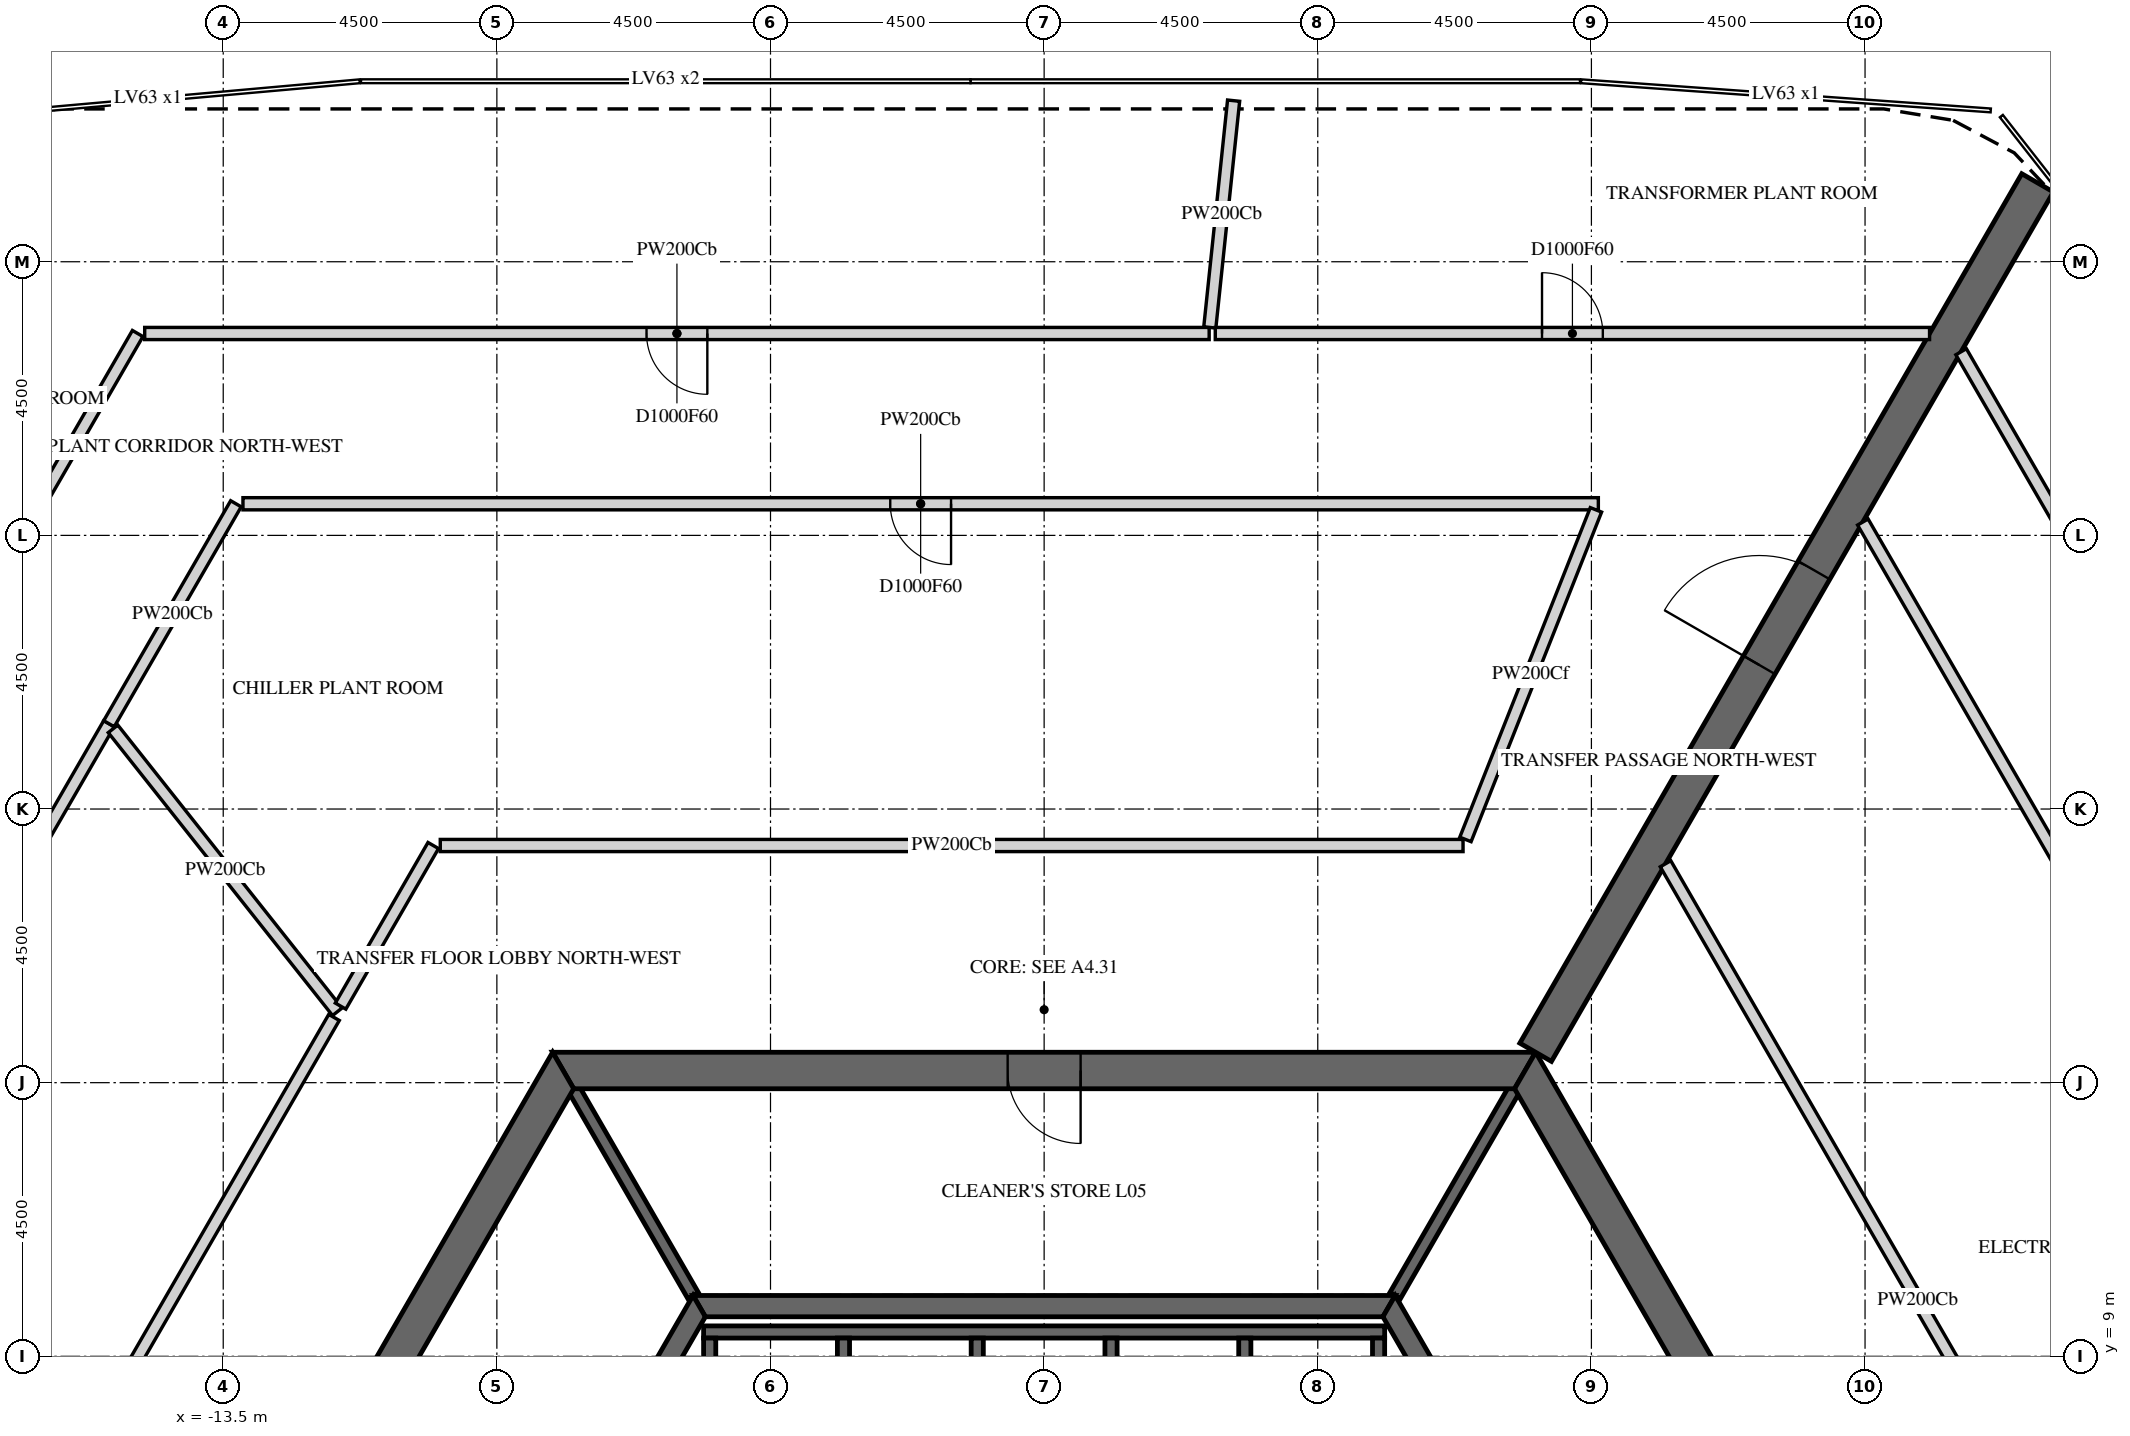
"""IFC4 building model, lengths in metres.
Left out: names, types, materials, properties, quantities, classifications, styles, units other than length and angle.
Written with IfcOpenShell. Run it as: python <this file> out.ifc"""

import sys

from ifc_helpers import new_model, si_unit, direction, frame, frame_2d, origin, place, context, subcontext, project, spatial, polyline, rectangle, outline, extrude, element, fill, save


model = new_model("IFC4")
c1 = context("Model", 3, precision=1e-05, world=origin(), true_north=direction((0.0, 1.0)))
c2 = subcontext(c1, "Body", "Model", "MODEL_VIEW")
j1 = project(units=[si_unit("LENGTHUNIT", "METRE"), si_unit("PLANEANGLEUNIT", "RADIAN")], contexts=[c1])
p1 = place(None, origin())
s1 = spatial("IfcSite", under=j1, at=p1, CompositionType="ELEMENT")
p2 = place(p1, origin())
s2 = spatial("IfcBuilding", under=s1, at=p2, CompositionType="ELEMENT")
p3 = place(p2, frame((0.0, 0.0, 31.5)))
s3 = spatial("IfcBuildingStorey", under=s2, at=p3, CompositionType="ELEMENT", Elevation=31.5)
p4 = place(p3, frame((-7.91, 13.7, -0.3), z_axis=(0.0, 0.0, 1.0), x_axis=(-0.499999880136, -0.866025472988, 0.0)))
e1 = element("IfcWall", 1, at=p4, inside=s3, PredefinedType="SHEAR", context=c2, shape_type="SweptSolid", body=[
    extrude(outline(polyline([(-0.173, -0.3), (15.993, -0.3), (15.646, 0.3), (0.173, 0.3), (-0.173, -0.3)])), origin(), (0.0, 0.0, 1.0), 6.15),
])
p5 = place(p4, frame((7.039, 0.0, 0.3)))
e2 = element("IfcOpeningElement", 2, at=p5, cuts=e1, PredefinedType="OPENING", context=c2, shape_type="SweptSolid", body=[
    extrude(rectangle(XDim=1.8, YDim=2.4, at=frame_2d((0.9, 1.2))), frame((0.0, 0.31, 0.0), z_axis=(0.0, -1.0, 0.0), x_axis=(1.0, 0.0, 0.0)), (0.0, 0.0, 1.0), 0.62),
])
p6 = place(p3, frame((15.819, 0.0, -0.3), z_axis=(0.0, 0.0, 1.0), x_axis=(-0.499999880136, 0.866025472988, 0.0)))
e3 = element("IfcWall", 3, at=p6, inside=s3, PredefinedType="SHEAR", context=c2, shape_type="SweptSolid", body=[
    extrude(outline(polyline([(-0.173, -0.3), (15.993, -0.3), (15.646, 0.3), (0.173, 0.3), (-0.173, -0.3)])), origin(), (0.0, 0.0, 1.0), 6.15),
])
p7 = place(p6, frame((6.981, 0.0, 0.3)))
e4 = element("IfcOpeningElement", 4, at=p7, cuts=e3, PredefinedType="OPENING", context=c2, shape_type="SweptSolid", body=[
    extrude(rectangle(XDim=1.8, YDim=2.4, at=frame_2d((0.9, 1.2))), frame((0.0, 0.31, 0.0), z_axis=(0.0, -1.0, 0.0), x_axis=(1.0, 0.0, 0.0)), (0.0, 0.0, 1.0), 0.62),
])
p8 = place(p3, frame((7.91, 13.7, -0.3), z_axis=(0.0, 0.0, 1.0), x_axis=(-1.0, 0.0, 0.0)))
e5 = element("IfcWall", 5, at=p8, inside=s3, PredefinedType="SHEAR", context=c2, shape_type="SweptSolid", body=[
    extrude(outline(polyline([(-0.173, -0.3), (15.993, -0.3), (15.646, 0.3), (0.173, 0.3), (-0.173, -0.3)])), origin(), (0.0, 0.0, 1.0), 6.15),
])
p9 = place(p8, frame((7.31, 0.0, 0.3)))
e6 = element("IfcOpeningElement", 6, at=p9, cuts=e5, PredefinedType="OPENING", context=c2, shape_type="SweptSolid", body=[
    extrude(rectangle(XDim=1.2, YDim=2.4, at=frame_2d((0.6, 1.2))), frame((0.0, 0.31, 0.0), z_axis=(0.0, -1.0, 0.0), x_axis=(1.0, 0.0, 0.0)), (0.0, 0.0, 1.0), 0.62),
])
p10 = place(p3, frame((8.083, 14.0, -0.3), z_axis=(0.0, 0.0, 1.0), x_axis=(0.499997680643, 0.866026742862, 0.0)))
e7 = element("IfcWall", 7, at=p10, inside=s3, PredefinedType="SHEAR", context=c2, shape_type="SweptSolid", body=[
    extrude(rectangle(XDim=16.509, YDim=0.6, at=frame_2d((8.254, 0.0))), origin(), (0.0, 0.0, 1.0), 6.15),
])
p11 = place(p10, frame((7.354, 0.0, 0.3)))
e8 = element("IfcOpeningElement", 8, at=p11, cuts=e7, PredefinedType="OPENING", context=c2, shape_type="SweptSolid", body=[
    extrude(rectangle(XDim=1.8, YDim=2.4, at=frame_2d((0.9, 1.2))), frame((0.0, 0.31, 0.0), z_axis=(0.0, -1.0, 0.0), x_axis=(1.0, 0.0, 0.0)), (0.0, 0.0, 1.0), 0.62),
])
p12 = place(p3, frame((-5.673, 9.825, -0.3), z_axis=(0.0, 0.0, 1.0), x_axis=(-0.499995046907, -0.866028263435, 0.0)))
e9 = element("IfcWall", 9, at=p12, inside=s3, PredefinedType="SHEAR", context=c2, shape_type="SweptSolid", body=[
    extrude(outline(polyline([(-0.101, -0.175), (11.446, -0.175), (11.244, 0.175), (0.101, 0.175), (-0.101, -0.175)])), origin(), (0.0, 0.0, 1.0), 6.15),
])
p13 = place(p12, frame((4.801, 0.0, 0.3)))
e10 = element("IfcOpeningElement", 10, at=p13, cuts=e9, PredefinedType="OPENING", context=c2, shape_type="SweptSolid", body=[
    extrude(rectangle(XDim=1.8, YDim=2.4, at=frame_2d((0.9, 1.2))), frame((0.0, 0.185, 0.0), z_axis=(0.0, -1.0, 0.0), x_axis=(1.0, 0.0, 0.0)), (0.0, 0.0, 1.0), 0.37),
])
p14 = place(p3, frame((11.345, 0.0, -0.3), z_axis=(0.0, 0.0, 1.0), x_axis=(-0.499995046907, 0.866028263435, 0.0)))
e11 = element("IfcWall", 11, at=p14, inside=s3, PredefinedType="SHEAR", context=c2, shape_type="SweptSolid", body=[
    extrude(outline(polyline([(-0.101, -0.175), (11.446, -0.175), (11.244, 0.175), (0.101, 0.175), (-0.101, -0.175)])), origin(), (0.0, 0.0, 1.0), 6.15),
])
p15 = place(p14, frame((4.744, 0.0, 0.3)))
e12 = element("IfcOpeningElement", 12, at=p15, cuts=e11, PredefinedType="OPENING", context=c2, shape_type="SweptSolid", body=[
    extrude(rectangle(XDim=1.8, YDim=2.4, at=frame_2d((0.9, 1.2))), frame((0.0, 0.185, 0.0), z_axis=(0.0, -1.0, 0.0), x_axis=(1.0, 0.0, 0.0)), (0.0, 0.0, 1.0), 0.37),
])
p16 = place(p3, frame((5.673, 9.825, -0.3), z_axis=(0.0, 0.0, 1.0), x_axis=(-1.0, 0.0, 0.0)))
e13 = element("IfcWall", 13, at=p16, inside=s3, PredefinedType="SHEAR", context=c2, shape_type="SweptSolid", body=[
    extrude(outline(polyline([(-0.101, -0.175), (11.446, -0.175), (11.244, 0.175), (0.101, 0.175), (-0.101, -0.175)])), origin(), (0.0, 0.0, 1.0), 6.15),
])
p17 = place(p3, frame((-5.6, 9.4, -0.25), z_axis=(0.0, 0.0, 1.0), x_axis=(1.0, 0.0, 0.0)))
e14 = element("IfcWall", 14, at=p17, inside=s3, PredefinedType="SHEAR", context=c2, shape_type="SweptSolid", body=[
    extrude(rectangle(XDim=11.2, YDim=0.2, at=frame_2d((5.6, 0.0))), origin(), (0.0, 0.0, 1.0), 6.0),
])
for number, where, z_axis, x_axis in (
    (15, (-5.5, 6.4, -0.25), (0.0, 0.0, 1.0), (0.0, 1.0, 0.0)),
    (16, (-3.3, 6.4, -0.25), (0.0, 0.0, 1.0), (0.0, 1.0, 0.0)),
    (17, (-1.1, 6.4, -0.25), (0.0, 0.0, 1.0), (0.0, 1.0, 0.0)),
    (18, (1.1, 6.4, -0.25), (0.0, 0.0, 1.0), (0.0, 1.0, 0.0)),
    (19, (3.3, 6.4, -0.25), (0.0, 0.0, 1.0), (0.0, 1.0, 0.0)),
    (20, (5.5, 6.4, -0.25), (0.0, 0.0, 1.0), (0.0, 1.0, 0.0)),
):
    element("IfcWall", number, at=place(p3, frame(where, z_axis=z_axis, x_axis=x_axis)), inside=s3, PredefinedType="SHEAR", context=c2, shape_type="SweptSolid", body=[
        extrude(rectangle(XDim=2.9, YDim=0.2, at=frame_2d((1.45, 0.0))), origin(), (0.0, 0.0, 1.0), 6.0),
    ])
for number, where, z_axis, x_axis in (
    (21, (5.773, 10.0, -0.3), (0.0, 0.0, 1.0), (0.5, 0.866, 0.0)),
    (22, (-5.773, 10.0, -0.3), (0.0, 0.0, 1.0), (-0.5, 0.866, 0.0)),
):
    element("IfcWall", number, at=place(p3, frame(where, z_axis=z_axis, x_axis=x_axis)), inside=s3, PredefinedType="SHEAR", context=c2, shape_type="SweptSolid", body=[
        extrude(rectangle(XDim=3.926, YDim=0.2, at=frame_2d((1.963, 0.0))), origin(), (0.0, 0.0, 1.0), 6.15),
    ])
p18 = place(p3, frame((-15.379, 19.403, 0.0), z_axis=(0.0, 0.0, 1.0), x_axis=(-0.499997101594, -0.866027077174, 0.0)))
e23 = element("IfcWall", 23, at=p18, inside=s3, PredefinedType="PARTITIONING", context=c2, shape_type="SweptSolid", body=[
    extrude(rectangle(XDim=22.058, YDim=0.2, at=frame_2d((11.029, 0.0))), origin(), (0.0, 0.0, 1.0), 5.85),
])
p19 = place(p18, frame((10.529, 0.0, 0.0)))
e24 = element("IfcOpeningElement", 24, at=p19, cuts=e23, PredefinedType="OPENING", context=c2, shape_type="SweptSolid", body=[
    extrude(rectangle(XDim=1.0, YDim=2.1, at=frame_2d((0.5, 1.05))), frame((0.0, 0.11, 0.0), z_axis=(0.0, -1.0, 0.0), x_axis=(1.0, 0.0, 0.0)), (0.0, 0.0, 1.0), 0.22),
])
p20 = place(p3, frame((-15.379, 19.403, 0.0), z_axis=(0.0, 0.0, 1.0), x_axis=(0.499936677724, 0.866061959831, 0.0)))
e25 = element("IfcWall", 25, at=p20, inside=s3, PredefinedType="PARTITIONING", context=c2, shape_type="SweptSolid", body=[
    extrude(rectangle(XDim=4.176, YDim=0.2, at=frame_2d((2.088, 0.0))), origin(), (0.0, 0.0, 1.0), 5.85),
])
p21 = place(p3, frame((-15.312, 19.319, 0.0), z_axis=(0.0, 0.0, 1.0), x_axis=(0.62121364233, -0.7836412512, 0.0)))
e26 = element("IfcWall", 26, at=p21, inside=s3, PredefinedType="PARTITIONING", context=c2, shape_type="SweptSolid", body=[
    extrude(rectangle(XDim=5.937, YDim=0.2, at=frame_2d((2.969, 0.0))), origin(), (0.0, 0.0, 1.0), 5.85),
])
p22 = place(p3, frame((-14.907, 25.82, 0.0), z_axis=(0.0, 0.0, 1.0), x_axis=(-0.500042271362, -0.866000997026, 0.0)))
e27 = element("IfcWall", 27, at=p22, inside=s3, PredefinedType="PARTITIONING", context=c2, shape_type="SweptSolid", body=[
    extrude(rectangle(XDim=9.317, YDim=0.2, at=frame_2d((4.659, 0.0))), origin(), (0.0, 0.0, 1.0), 5.85),
])
p23 = place(p3, frame((9.114, 23.02, 0.0), z_axis=(0.0, 0.0, 1.0), x_axis=(-1.0, 0.0, 0.0)))
e28 = element("IfcWall", 28, at=p23, inside=s3, PredefinedType="PARTITIONING", context=c2, shape_type="SweptSolid", body=[
    extrude(rectangle(XDim=22.29, YDim=0.2, at=frame_2d((11.145, 0.0))), origin(), (0.0, 0.0, 1.0), 5.85),
])
p24 = place(p23, frame((10.645, 0.0, 0.0)))
e29 = element("IfcOpeningElement", 29, at=p24, cuts=e28, PredefinedType="OPENING", context=c2, shape_type="SweptSolid", body=[
    extrude(rectangle(XDim=1.0, YDim=2.1, at=frame_2d((0.5, 1.05))), frame((0.0, 0.11, 0.0), z_axis=(0.0, -1.0, 0.0), x_axis=(1.0, 0.0, 0.0)), (0.0, 0.0, 1.0), 0.22),
])
p25 = place(p3, frame((-11.678, 14.573, 0.0), z_axis=(0.0, 0.0, 1.0), x_axis=(-0.500039172404, -0.866002786405, 0.0)))
e30 = element("IfcWall", 30, at=p25, inside=s3, PredefinedType="PARTITIONING", context=c2, shape_type="SweptSolid", body=[
    extrude(rectangle(XDim=16.481, YDim=0.2, at=frame_2d((8.241, 0.0))), origin(), (0.0, 0.0, 1.0), 5.85),
])
p26 = place(p3, frame((-10.046, 17.4, 0.0), z_axis=(0.0, 0.0, 1.0), x_axis=(-0.499928067852, -0.866066929846, 0.0)))
e31 = element("IfcWall", 31, at=p26, inside=s3, PredefinedType="PARTITIONING", context=c2, shape_type="SweptSolid", body=[
    extrude(rectangle(XDim=3.049, YDim=0.2, at=frame_2d((1.525, 0.0))), origin(), (0.0, 0.0, 1.0), 5.85),
])
p27 = place(p3, frame((2.714, 25.82, 0.0), z_axis=(0.0, 0.0, 1.0), x_axis=(-1.0, 0.0, 0.0)))
e32 = element("IfcWall", 32, at=p27, inside=s3, PredefinedType="PARTITIONING", context=c2, shape_type="SweptSolid", body=[
    extrude(rectangle(XDim=17.506, YDim=0.2, at=frame_2d((8.753, 0.0))), origin(), (0.0, 0.0, 1.0), 5.85),
])
p28 = place(p27, frame((8.253, 0.0, 0.0)))
e33 = element("IfcOpeningElement", 33, at=p28, cuts=e32, PredefinedType="OPENING", context=c2, shape_type="SweptSolid", body=[
    extrude(rectangle(XDim=1.0, YDim=2.1, at=frame_2d((0.5, 1.05))), frame((0.0, 0.11, 0.0), z_axis=(0.0, -1.0, 0.0), x_axis=(1.0, 0.0, 0.0)), (0.0, 0.0, 1.0), 0.22),
])
p29 = place(p3, frame((3.116, 29.649, 0.0), z_axis=(0.0, 0.0, 1.0), x_axis=(-0.104376339502, -0.994537872457, 0.0)))
e34 = element("IfcWall", 34, at=p29, inside=s3, PredefinedType="PARTITIONING", context=c2, shape_type="SweptSolid", body=[
    extrude(rectangle(XDim=3.75, YDim=0.2, at=frame_2d((1.875, 0.0))), origin(), (0.0, 0.0, 1.0), 5.85),
])
p30 = place(p3, frame((6.889, 17.4, 0.0), z_axis=(0.0, 0.0, 1.0), x_axis=(-1.0, 0.0, 0.0)))
e35 = element("IfcWall", 35, at=p30, inside=s3, PredefinedType="PARTITIONING", context=c2, shape_type="SweptSolid", body=[
    extrude(rectangle(XDim=16.819, YDim=0.2, at=frame_2d((8.41, 0.0))), origin(), (0.0, 0.0, 1.0), 5.85),
])
p31 = place(p3, frame((9.074, 22.92, 0.0), z_axis=(0.0, 0.0, 1.0), x_axis=(-0.368102763672, -0.929785112473, 0.0)))
e36 = element("IfcWall", 36, at=p31, inside=s3, PredefinedType="PARTITIONING", context=c2, shape_type="SweptSolid", body=[
    extrude(rectangle(XDim=5.829, YDim=0.2, at=frame_2d((2.915, 0.0))), origin(), (0.0, 0.0, 1.0), 5.088),
])
p32 = place(p3, frame((24.493, 3.617, 0.0), z_axis=(0.0, 0.0, 1.0), x_axis=(-0.49998880049, 0.866031869728, 0.0)))
e37 = element("IfcWall", 37, at=p32, inside=s3, PredefinedType="PARTITIONING", context=c2, shape_type="SweptSolid", body=[
    extrude(rectangle(XDim=22.058, YDim=0.2, at=frame_2d((11.029, 0.0))), origin(), (0.0, 0.0, 1.0), 5.85),
])
p33 = place(p32, frame((10.529, 0.0, 0.0)))
e38 = element("IfcOpeningElement", 38, at=p33, cuts=e37, PredefinedType="OPENING", context=c2, shape_type="SweptSolid", body=[
    extrude(rectangle(XDim=1.0, YDim=2.1, at=frame_2d((0.5, 1.05))), frame((0.0, 0.11, 0.0), z_axis=(0.0, -1.0, 0.0), x_axis=(1.0, 0.0, 0.0)), (0.0, 0.0, 1.0), 0.22),
])
p34 = place(p3, frame((2.814, 25.82, 0.0), z_axis=(0.0, 0.0, 1.0), x_axis=(1.0, 0.0, 0.0)))
e39 = element("IfcWall", 39, at=p34, inside=s3, PredefinedType="PARTITIONING", context=c2, shape_type="SweptSolid", body=[
    extrude(rectangle(XDim=11.747, YDim=0.2, at=frame_2d((5.873, 0.0))), origin(), (0.0, 0.0, 1.0), 5.85),
])
p35 = place(p34, frame((5.373, 0.0, 0.0)))
e40 = element("IfcOpeningElement", 40, at=p35, cuts=e39, PredefinedType="OPENING", context=c2, shape_type="SweptSolid", body=[
    extrude(rectangle(XDim=1.0, YDim=2.1, at=frame_2d((0.5, 1.05))), frame((0.0, 0.11, 0.0), z_axis=(0.0, -1.0, 0.0), x_axis=(1.0, 0.0, 0.0)), (0.0, 0.0, 1.0), 0.22),
])
p36 = place(p3, frame((18.513, 2.734, 0.0), z_axis=(0.0, 0.0, 1.0), x_axis=(-0.499982347303, 0.866035595334, 0.0)))
e41 = element("IfcWall", 41, at=p36, inside=s3, PredefinedType="PARTITIONING", context=c2, shape_type="SweptSolid", body=[
    extrude(rectangle(XDim=16.588, YDim=0.2, at=frame_2d((8.294, 0.0))), origin(), (0.0, 0.0, 1.0), 5.85),
])
p37 = place(p3, frame((15.08, 25.52, 0.0), z_axis=(0.0, 0.0, 1.0), x_axis=(0.500034818431, -0.866005300421, 0.0)))
e42 = element("IfcWall", 42, at=p37, inside=s3, PredefinedType="PARTITIONING", context=c2, shape_type="SweptSolid", body=[
    extrude(rectangle(XDim=17.275, YDim=0.2, at=frame_2d((8.637, 0.0))), origin(), (0.0, 0.0, 1.0), 5.85),
])
p38 = place(p37, frame((8.137, 0.0, 0.0)))
e43 = element("IfcOpeningElement", 43, at=p38, cuts=e42, PredefinedType="OPENING", context=c2, shape_type="SweptSolid", body=[
    extrude(rectangle(XDim=1.0, YDim=2.1, at=frame_2d((0.5, 1.05))), frame((0.0, 0.11, 0.0), z_axis=(0.0, -1.0, 0.0), x_axis=(1.0, 0.0, 0.0)), (0.0, 0.0, 1.0), 0.22),
])
p39 = place(p9, origin())
e44 = element("IfcDoor", 44, at=p39, inside=s3, OperationType="SINGLE_SWING_LEFT", PredefinedType="DOOR", context=c2, shape_type="SweptSolid", body=[
    extrude(rectangle(XDim=1.2, YDim=2.4, at=frame_2d((0.6, 1.2))), frame((0.0, 0.025, 0.0), z_axis=(0.0, -1.0, 0.0), x_axis=(1.0, 0.0, 0.0)), (0.0, 0.0, 1.0), 0.05),
])
fill(e6, e44)
p40 = place(p11, origin())
e45 = element("IfcDoor", 45, at=p40, inside=s3, OperationType="DOUBLE_DOOR_SINGLE_SWING", PredefinedType="DOOR", context=c2, shape_type="SweptSolid", body=[
    extrude(rectangle(XDim=1.8, YDim=2.4, at=frame_2d((0.9, 1.2))), frame((0.0, 0.025, 0.0), z_axis=(0.0, -1.0, 0.0), x_axis=(1.0, 0.0, 0.0)), (0.0, 0.0, 1.0), 0.05),
])
fill(e8, e45)
p41 = place(p24, origin())
e46 = element("IfcDoor", 46, at=p41, inside=s3, OperationType="SINGLE_SWING_RIGHT", PredefinedType="DOOR", context=c2, shape_type="SweptSolid", body=[
    extrude(rectangle(XDim=1.0, YDim=2.1, at=frame_2d((0.5, 1.05))), frame((0.0, 0.025, 0.0), z_axis=(0.0, -1.0, 0.0), x_axis=(1.0, 0.0, 0.0)), (0.0, 0.0, 1.0), 0.05),
])
fill(e29, e46)
p42 = place(p28, origin())
e47 = element("IfcDoor", 47, at=p42, inside=s3, OperationType="SINGLE_SWING_RIGHT", PredefinedType="DOOR", context=c2, shape_type="SweptSolid", body=[
    extrude(rectangle(XDim=1.0, YDim=2.1, at=frame_2d((0.5, 1.05))), frame((0.0, 0.025, 0.0), z_axis=(0.0, -1.0, 0.0), x_axis=(1.0, 0.0, 0.0)), (0.0, 0.0, 1.0), 0.05),
])
fill(e33, e47)
p43 = place(p35, origin())
e48 = element("IfcDoor", 48, at=p43, inside=s3, OperationType="SINGLE_SWING_LEFT", PredefinedType="DOOR", context=c2, shape_type="SweptSolid", body=[
    extrude(rectangle(XDim=1.0, YDim=2.1, at=frame_2d((0.5, 1.05))), frame((0.0, 0.025, 0.0), z_axis=(0.0, -1.0, 0.0), x_axis=(1.0, 0.0, 0.0)), (0.0, 0.0, 1.0), 0.05),
])
fill(e40, e48)
save(model, sys.argv[1])
